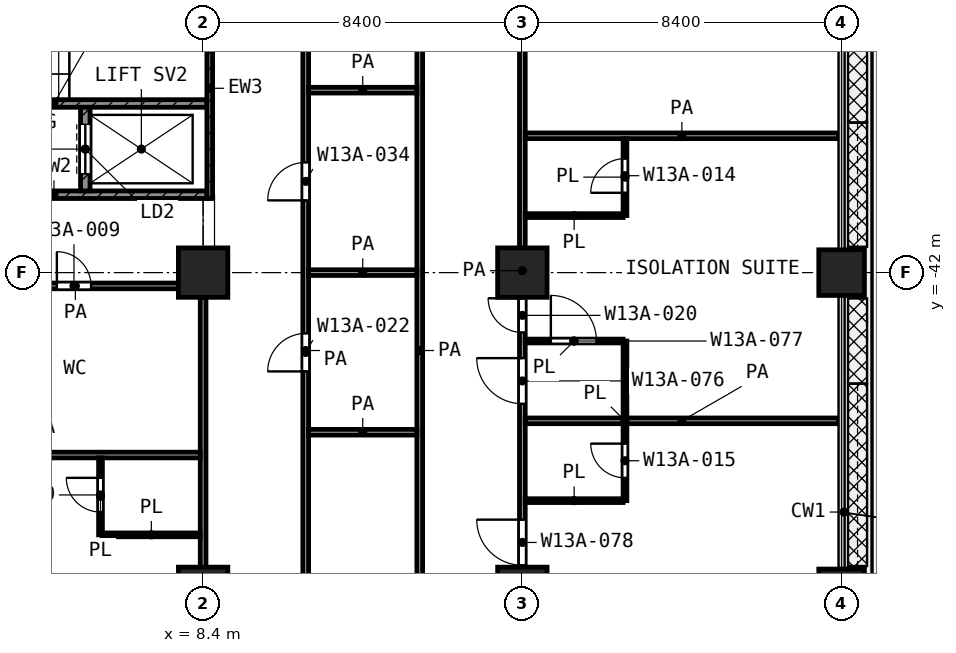
"""IFC4 building model, lengths in metres.
Left out: names, types, materials, properties, quantities, classifications, styles, units other than length and angle.
Written with IfcOpenShell. Run it as: python <this file> out.ifc"""

import sys

from ifc_helpers import new_model, si_unit, direction, frame, frame_2d, origin, origin_2d, place, context, subcontext, project, spatial, rectangle, extrude, element, fill, save


model = new_model("IFC4")
c1 = context("Model", 3, precision=1e-05, world=origin(), true_north=direction((0.0, 1.0)))
c2 = subcontext(c1, "Body", "Model", "MODEL_VIEW")
j1 = project(units=[si_unit("LENGTHUNIT", "METRE"), si_unit("PLANEANGLEUNIT", "RADIAN")], contexts=[c1])
p1 = place(None, origin())
s1 = spatial("IfcSite", under=j1, at=p1, CompositionType="ELEMENT")
p2 = place(p1, origin())
s2 = spatial("IfcBuilding", under=s1, at=p2, CompositionType="ELEMENT")
p3 = place(p2, frame((0.0, 0.0, 60.2)))
s3 = spatial("IfcBuildingStorey", under=s2, at=p3, CompositionType="ELEMENT", Elevation=60.2)
for number, where, z_axis, x_axis in (
    (1, (8.4, -42.0, 0.0), (0.0, 0.0, 1.0), (1.0, 0.0, 0.0)),
    (2, (16.8, -42.0, 0.0), (0.0, 0.0, 1.0), (1.0, 0.0, 0.0)),
):
    element("IfcColumn", number, at=place(p3, frame(where, z_axis=z_axis, x_axis=x_axis)), inside=s3, PredefinedType="COLUMN", context=c2, shape_type="SweptSolid", body=[
        extrude(rectangle(XDim=1.3, YDim=1.3, at=origin_2d()), origin(), (0.0, 0.0, 1.0), 4.2),
    ])
p4 = place(p3, frame((25.2, -42.0, 0.0), z_axis=(0.0, 0.0, 1.0), x_axis=(1.0, 0.0, 0.0)))
e3 = element("IfcColumn", 3, at=p4, inside=s3, PredefinedType="COLUMN", context=c2, shape_type="SweptSolid", body=[
    extrude(rectangle(XDim=1.2, YDim=1.2, at=origin_2d()), origin(), (0.0, 0.0, 1.0), 4.2),
])
for number, where, z_axis, x_axis in (
    (4, (8.4, -50.4, 0.0), (0.0, 0.0, 1.0), (1.0, 0.0, 0.0)),
    (5, (16.8, -50.4, 0.0), (0.0, 0.0, 1.0), (1.0, 0.0, 0.0)),
):
    element("IfcColumn", number, at=place(p3, frame(where, z_axis=z_axis, x_axis=x_axis)), inside=s3, PredefinedType="COLUMN", context=c2, shape_type="SweptSolid", body=[
        extrude(rectangle(XDim=1.3, YDim=1.3, at=origin_2d()), origin(), (0.0, 0.0, 1.0), 4.2),
    ])
p5 = place(p3, frame((25.2, -50.4, 0.0), z_axis=(0.0, 0.0, 1.0), x_axis=(1.0, 0.0, 0.0)))
e6 = element("IfcColumn", 6, at=p5, inside=s3, PredefinedType="COLUMN", context=c2, shape_type="SweptSolid", body=[
    extrude(rectangle(XDim=1.2, YDim=1.2, at=origin_2d()), origin(), (0.0, 0.0, 1.0), 4.2),
])
p6 = place(p3, frame((8.575, -40.05, 0.0), z_axis=(0.0, 0.0, 1.0), x_axis=(0.0, 1.0, 0.0)))
e7 = element("IfcWall", 7, at=p6, inside=s3, PredefinedType="SHEAR", context=c2, shape_type="SweptSolid", body=[
    extrude(rectangle(XDim=5.8, YDim=0.15, at=frame_2d((2.9, 0.0))), origin(), (0.0, 0.0, 1.0), 3.9),
])
p7 = place(p3, frame((0.45, -37.55, 0.0), z_axis=(0.0, 0.0, 1.0), x_axis=(1.0, 0.0, 0.0)))
e8 = element("IfcWall", 8, at=p7, inside=s3, PredefinedType="SHEAR", context=c2, shape_type="SweptSolid", body=[
    extrude(rectangle(XDim=8.05, YDim=0.2, at=frame_2d((4.025, 0.0))), origin(), (0.0, 0.0, 1.0), 3.9),
])
p8 = place(p7, frame((0.1, 0.0, 0.0)))
e9 = element("IfcOpeningElement", 9, at=p8, cuts=e8, PredefinedType="OPENING", context=c2, shape_type="SweptSolid", body=[
    extrude(rectangle(XDim=1.1, YDim=2.1, at=frame_2d((0.55, 1.05))), frame((0.0, 0.11, 0.0), z_axis=(0.0, -1.0, 0.0), x_axis=(1.0, 0.0, 0.0)), (0.0, 0.0, 1.0), 0.22),
])
p9 = place(p3, frame((0.45, -39.95, 0.0), z_axis=(0.0, 0.0, 1.0), x_axis=(1.0, 0.0, 0.0)))
e10 = element("IfcWall", 10, at=p9, inside=s3, PredefinedType="SHEAR", context=c2, shape_type="SweptSolid", body=[
    extrude(rectangle(XDim=8.05, YDim=0.2, at=frame_2d((4.025, 0.0))), origin(), (0.0, 0.0, 1.0), 3.9),
])
p10 = place(p9, frame((2.0, 0.0, 0.0)))
e11 = element("IfcOpeningElement", 11, at=p10, cuts=e10, PredefinedType="OPENING", context=c2, shape_type="SweptSolid", body=[
    extrude(rectangle(XDim=1.1, YDim=2.1, at=frame_2d((0.55, 1.05))), frame((0.0, 0.11, 0.0), z_axis=(0.0, -1.0, 0.0), x_axis=(1.0, 0.0, 0.0)), (0.0, 0.0, 1.0), 0.22),
])
p11 = place(p3, frame((5.3, -39.85, 0.0), z_axis=(0.0, 0.0, 1.0), x_axis=(0.0, 1.0, 0.0)))
e12 = element("IfcWall", 12, at=p11, inside=s3, PredefinedType="SHEAR", context=c2, shape_type="SweptSolid", body=[
    extrude(rectangle(XDim=2.2, YDim=0.25, at=frame_2d((1.1, 0.0))), origin(), (0.0, 0.0, 1.0), 3.9),
])
p12 = place(p11, frame((0.45, 0.0, 0.0)))
e13 = element("IfcOpeningElement", 13, at=p12, cuts=e12, PredefinedType="OPENING", context=c2, shape_type="SweptSolid", body=[
    extrude(rectangle(XDim=1.3, YDim=2.1, at=frame_2d((0.65, 1.05))), frame((0.0, 0.135, 0.0), z_axis=(0.0, -1.0, 0.0), x_axis=(1.0, 0.0, 0.0)), (0.0, 0.0, 1.0), 0.27),
])
for number, where, z_axis, x_axis in (
    (14, (5.75, -48.9, 0.0), (0.0, 0.0, 1.0), (1.0, 0.0, 0.0)),
    (15, (16.875, -48.0, 0.0), (0.0, 0.0, 1.0), (1.0, 0.0, 0.0)),
):
    element("IfcWall", number, at=place(p3, frame(where, z_axis=z_axis, x_axis=x_axis)), inside=s3, PredefinedType="PARTITIONING", context=c2, shape_type="SweptSolid", body=[
        extrude(rectangle(XDim=2.575, YDim=0.1, at=frame_2d((1.288, 0.0))), origin(), (0.0, 0.0, 1.0), 3.9),
    ])
p13 = place(p3, frame((16.875, -43.8, 0.0), z_axis=(0.0, 0.0, 1.0), x_axis=(1.0, 0.0, 0.0)))
e16 = element("IfcWall", 16, at=p13, inside=s3, PredefinedType="PARTITIONING", context=c2, shape_type="SweptSolid", body=[
    extrude(rectangle(XDim=2.575, YDim=0.1, at=frame_2d((1.288, 0.0))), origin(), (0.0, 0.0, 1.0), 3.9),
])
p14 = place(p13, frame((0.675, 0.0, 0.0)))
e17 = element("IfcOpeningElement", 17, at=p14, cuts=e16, PredefinedType="OPENING", context=c2, shape_type="SweptSolid", body=[
    extrude(rectangle(XDim=1.2, YDim=2.1, at=frame_2d((0.6, 1.05))), frame((0.0, 0.06, 0.0), z_axis=(0.0, -1.0, 0.0), x_axis=(1.0, 0.0, 0.0)), (0.0, 0.0, 1.0), 0.12),
])
p15 = place(p3, frame((16.875, -40.5, 0.0), z_axis=(0.0, 0.0, 1.0), x_axis=(1.0, 0.0, 0.0)))
e18 = element("IfcWall", 18, at=p15, inside=s3, PredefinedType="PARTITIONING", context=c2, shape_type="SweptSolid", body=[
    extrude(rectangle(XDim=2.575, YDim=0.1, at=frame_2d((1.288, 0.0))), origin(), (0.0, 0.0, 1.0), 3.9),
])
p16 = place(p3, frame((5.7, -48.9, 0.0), z_axis=(0.0, 0.0, 1.0), x_axis=(0.0, 1.0, 0.0)))
e19 = element("IfcWall", 19, at=p16, inside=s3, PredefinedType="PARTITIONING", context=c2, shape_type="SweptSolid", body=[
    extrude(rectangle(XDim=2.025, YDim=0.1, at=frame_2d((1.012, 0.0))), origin(), (0.0, 0.0, 1.0), 3.9),
])
p17 = place(p16, frame((0.6, 0.0, 0.0)))
e20 = element("IfcOpeningElement", 20, at=p17, cuts=e19, PredefinedType="OPENING", context=c2, shape_type="SweptSolid", body=[
    extrude(rectangle(XDim=0.9, YDim=2.1, at=frame_2d((0.45, 1.05))), frame((0.0, 0.06, 0.0), z_axis=(0.0, -1.0, 0.0), x_axis=(1.0, 0.0, 0.0)), (0.0, 0.0, 1.0), 0.12),
])
p18 = place(p3, frame((19.5, -48.0, 0.0), z_axis=(0.0, 0.0, 1.0), x_axis=(0.0, 1.0, 0.0)))
e21 = element("IfcWall", 21, at=p18, inside=s3, PredefinedType="PARTITIONING", context=c2, shape_type="SweptSolid", body=[
    extrude(rectangle(XDim=4.2, YDim=0.1, at=frame_2d((2.1, 0.0))), origin(), (0.0, 0.0, 1.0), 3.9),
])
p19 = place(p18, frame((0.6, 0.0, 0.0)))
e22 = element("IfcOpeningElement", 22, at=p19, cuts=e21, PredefinedType="OPENING", context=c2, shape_type="SweptSolid", body=[
    extrude(rectangle(XDim=0.9, YDim=2.1, at=frame_2d((0.45, 1.05))), frame((0.0, 0.06, 0.0), z_axis=(0.0, -1.0, 0.0), x_axis=(1.0, 0.0, 0.0)), (0.0, 0.0, 1.0), 0.12),
])
p20 = place(p3, frame((19.5, -40.5, 0.0), z_axis=(0.0, 0.0, 1.0), x_axis=(0.0, 1.0, 0.0)))
e23 = element("IfcWall", 23, at=p20, inside=s3, PredefinedType="PARTITIONING", context=c2, shape_type="SweptSolid", body=[
    extrude(rectangle(XDim=2.025, YDim=0.1, at=frame_2d((1.012, 0.0))), origin(), (0.0, 0.0, 1.0), 3.9),
])
p21 = place(p20, frame((0.6, 0.0, 0.0)))
e24 = element("IfcOpeningElement", 24, at=p21, cuts=e23, PredefinedType="OPENING", context=c2, shape_type="SweptSolid", body=[
    extrude(rectangle(XDim=0.9, YDim=2.1, at=frame_2d((0.45, 1.05))), frame((0.0, 0.06, 0.0), z_axis=(0.0, -1.0, 0.0), x_axis=(1.0, 0.0, 0.0)), (0.0, 0.0, 1.0), 0.12),
])
p22 = place(p3, frame((0.08, -46.8, 0.0), z_axis=(0.0, 0.0, 1.0), x_axis=(1.0, 0.0, 0.0)))
e25 = element("IfcWall", 25, at=p22, inside=s3, PredefinedType="PARTITIONING", context=c2, shape_type="SweptSolid", body=[
    extrude(rectangle(XDim=8.245, YDim=0.15, at=frame_2d((4.123, 0.0))), origin(), (0.0, 0.0, 1.0), 3.9),
])
p23 = place(p3, frame((11.175, -46.2, 0.0), z_axis=(0.0, 0.0, 1.0), x_axis=(1.0, 0.0, 0.0)))
e26 = element("IfcWall", 26, at=p23, inside=s3, PredefinedType="PARTITIONING", context=c2, shape_type="SweptSolid", body=[
    extrude(rectangle(XDim=2.85, YDim=0.15, at=frame_2d((1.425, 0.0))), origin(), (0.0, 0.0, 1.0), 3.9),
])
p24 = place(p3, frame((16.875, -45.9, 0.0), z_axis=(0.0, 0.0, 1.0), x_axis=(1.0, 0.0, 0.0)))
e27 = element("IfcWall", 27, at=p24, inside=s3, PredefinedType="PARTITIONING", context=c2, shape_type="SweptSolid", body=[
    extrude(rectangle(XDim=8.245, YDim=0.15, at=frame_2d((4.123, 0.0))), origin(), (0.0, 0.0, 1.0), 3.9),
])
p25 = place(p3, frame((2.328, -42.35, 0.0), z_axis=(0.0, 0.0, 1.0), x_axis=(1.0, 0.0, 0.0)))
e28 = element("IfcWall", 28, at=p25, inside=s3, PredefinedType="PARTITIONING", context=c2, shape_type="SweptSolid", body=[
    extrude(rectangle(XDim=5.422, YDim=0.15, at=frame_2d((2.711, 0.0))), origin(), (0.0, 0.0, 1.0), 3.9),
])
p26 = place(p25, frame((2.224, 0.0, 0.0)))
e29 = element("IfcOpeningElement", 29, at=p26, cuts=e28, PredefinedType="OPENING", context=c2, shape_type="SweptSolid", body=[
    extrude(rectangle(XDim=0.9, YDim=2.1, at=frame_2d((0.45, 1.05))), frame((0.0, 0.085, 0.0), z_axis=(0.0, -1.0, 0.0), x_axis=(1.0, 0.0, 0.0)), (0.0, 0.0, 1.0), 0.17),
])
p27 = place(p3, frame((11.175, -42.0, 0.0), z_axis=(0.0, 0.0, 1.0), x_axis=(1.0, 0.0, 0.0)))
e30 = element("IfcWall", 30, at=p27, inside=s3, PredefinedType="PARTITIONING", context=c2, shape_type="SweptSolid", body=[
    extrude(rectangle(XDim=2.85, YDim=0.15, at=frame_2d((1.425, 0.0))), origin(), (0.0, 0.0, 1.0), 3.9),
])
p28 = place(p3, frame((16.875, -38.4, 0.0), z_axis=(0.0, 0.0, 1.0), x_axis=(1.0, 0.0, 0.0)))
e31 = element("IfcWall", 31, at=p28, inside=s3, PredefinedType="PARTITIONING", context=c2, shape_type="SweptSolid", body=[
    extrude(rectangle(XDim=8.245, YDim=0.15, at=frame_2d((4.123, 0.0))), origin(), (0.0, 0.0, 1.0), 3.9),
])
p29 = place(p3, frame((11.175, -37.2, 0.0), z_axis=(0.0, 0.0, 1.0), x_axis=(1.0, 0.0, 0.0)))
e32 = element("IfcWall", 32, at=p29, inside=s3, PredefinedType="PARTITIONING", context=c2, shape_type="SweptSolid", body=[
    extrude(rectangle(XDim=2.85, YDim=0.15, at=frame_2d((1.425, 0.0))), origin(), (0.0, 0.0, 1.0), 3.9),
])
p30 = place(p3, frame((8.4, -66.55, 0.0), z_axis=(0.0, 0.0, 1.0), x_axis=(0.0, 1.0, 0.0)))
e33 = element("IfcWall", 33, at=p30, inside=s3, PredefinedType="PARTITIONING", context=c2, shape_type="SweptSolid", body=[
    extrude(rectangle(XDim=23.9, YDim=0.15, at=frame_2d((11.95, 0.0))), origin(), (0.0, 0.0, 1.0), 3.9),
])
p31 = place(p30, frame((14.55, 0.0, 0.0)))
e34 = element("IfcOpeningElement", 34, at=p31, cuts=e33, PredefinedType="OPENING", context=c2, shape_type="SweptSolid", body=[
    extrude(rectangle(XDim=0.9, YDim=2.1, at=frame_2d((0.45, 1.05))), frame((0.0, 0.085, 0.0), z_axis=(0.0, -1.0, 0.0), x_axis=(1.0, 0.0, 0.0)), (0.0, 0.0, 1.0), 0.17),
])
p32 = place(p30, frame((12.7, 0.0, 0.0)))
e35 = element("IfcOpeningElement", 35, at=p32, cuts=e33, PredefinedType="OPENING", context=c2, shape_type="SweptSolid", body=[
    extrude(rectangle(XDim=1.2, YDim=2.1, at=frame_2d((0.6, 1.05))), frame((0.0, 0.085, 0.0), z_axis=(0.0, -1.0, 0.0), x_axis=(1.0, 0.0, 0.0)), (0.0, 0.0, 1.0), 0.17),
])
p33 = place(p30, frame((5.85, 0.0, 0.0)))
e36 = element("IfcOpeningElement", 36, at=p33, cuts=e33, PredefinedType="OPENING", context=c2, shape_type="SweptSolid", body=[
    extrude(rectangle(XDim=1.2, YDim=2.1, at=frame_2d((0.6, 1.05))), frame((0.0, 0.085, 0.0), z_axis=(0.0, -1.0, 0.0), x_axis=(1.0, 0.0, 0.0)), (0.0, 0.0, 1.0), 0.17),
])
p34 = place(p30, frame((8.45, 0.0, 0.0)))
e37 = element("IfcOpeningElement", 37, at=p34, cuts=e33, PredefinedType="OPENING", context=c2, shape_type="SweptSolid", body=[
    extrude(rectangle(XDim=1.2, YDim=2.1, at=frame_2d((0.6, 1.05))), frame((0.0, 0.085, 0.0), z_axis=(0.0, -1.0, 0.0), x_axis=(1.0, 0.0, 0.0)), (0.0, 0.0, 1.0), 0.17),
])
p35 = place(p30, frame((3.7, 0.0, 0.0)))
e38 = element("IfcOpeningElement", 38, at=p35, cuts=e33, PredefinedType="OPENING", context=c2, shape_type="SweptSolid", body=[
    extrude(rectangle(XDim=1.2, YDim=2.1, at=frame_2d((0.6, 1.05))), frame((0.0, 0.085, 0.0), z_axis=(0.0, -1.0, 0.0), x_axis=(1.0, 0.0, 0.0)), (0.0, 0.0, 1.0), 0.17),
])
p36 = place(p30, frame((1.175, 0.0, 0.0)))
e39 = element("IfcOpeningElement", 39, at=p36, cuts=e33, PredefinedType="OPENING", context=c2, shape_type="SweptSolid", body=[
    extrude(rectangle(XDim=0.9, YDim=2.1, at=frame_2d((0.45, 1.05))), frame((0.0, 0.085, 0.0), z_axis=(0.0, -1.0, 0.0), x_axis=(1.0, 0.0, 0.0)), (0.0, 0.0, 1.0), 0.17),
])
p37 = place(p3, frame((11.1, -58.7, 0.0), z_axis=(0.0, 0.0, 1.0), x_axis=(0.0, 1.0, 0.0)))
e40 = element("IfcWall", 40, at=p37, inside=s3, PredefinedType="PARTITIONING", context=c2, shape_type="SweptSolid", body=[
    extrude(rectangle(XDim=29.3, YDim=0.15, at=frame_2d((14.65, 0.0))), origin(), (0.0, 0.0, 1.0), 3.9),
])
p38 = place(p37, frame((24.9, 0.0, 0.0)))
e41 = element("IfcOpeningElement", 41, at=p38, cuts=e40, PredefinedType="OPENING", context=c2, shape_type="SweptSolid", body=[
    extrude(rectangle(XDim=1.0, YDim=2.1, at=frame_2d((0.5, 1.05))), frame((0.0, 0.085, 0.0), z_axis=(0.0, -1.0, 0.0), x_axis=(1.0, 0.0, 0.0)), (0.0, 0.0, 1.0), 0.17),
])
p39 = place(p37, frame((18.6, 0.0, 0.0)))
e42 = element("IfcOpeningElement", 42, at=p39, cuts=e40, PredefinedType="OPENING", context=c2, shape_type="SweptSolid", body=[
    extrude(rectangle(XDim=1.0, YDim=2.1, at=frame_2d((0.5, 1.05))), frame((0.0, 0.085, 0.0), z_axis=(0.0, -1.0, 0.0), x_axis=(1.0, 0.0, 0.0)), (0.0, 0.0, 1.0), 0.17),
])
p40 = place(p37, frame((14.1, 0.0, 0.0)))
e43 = element("IfcOpeningElement", 43, at=p40, cuts=e40, PredefinedType="OPENING", context=c2, shape_type="SweptSolid", body=[
    extrude(rectangle(XDim=1.0, YDim=2.1, at=frame_2d((0.5, 1.05))), frame((0.0, 0.085, 0.0), z_axis=(0.0, -1.0, 0.0), x_axis=(1.0, 0.0, 0.0)), (0.0, 0.0, 1.0), 0.17),
])
p41 = place(p37, frame((1.2, 0.0, 0.0)))
e44 = element("IfcOpeningElement", 44, at=p41, cuts=e40, PredefinedType="OPENING", context=c2, shape_type="SweptSolid", body=[
    extrude(rectangle(XDim=1.0, YDim=2.1, at=frame_2d((0.5, 1.05))), frame((0.0, 0.085, 0.0), z_axis=(0.0, -1.0, 0.0), x_axis=(1.0, 0.0, 0.0)), (0.0, 0.0, 1.0), 0.17),
])
p42 = place(p3, frame((14.1, -58.7, 0.0), z_axis=(0.0, 0.0, 1.0), x_axis=(0.0, 1.0, 0.0)))
e45 = element("IfcWall", 45, at=p42, inside=s3, PredefinedType="PARTITIONING", context=c2, shape_type="SweptSolid", body=[
    extrude(rectangle(XDim=29.3, YDim=0.15, at=frame_2d((14.65, 0.0))), origin(), (0.0, 0.0, 1.0), 3.9),
])
p43 = place(p42, frame((7.5, 0.0, 0.0)))
e46 = element("IfcOpeningElement", 46, at=p43, cuts=e45, PredefinedType="OPENING", context=c2, shape_type="SweptSolid", body=[
    extrude(rectangle(XDim=1.0, YDim=2.1, at=frame_2d((0.5, 1.05))), frame((0.0, 0.085, 0.0), z_axis=(0.0, -1.0, 0.0), x_axis=(1.0, 0.0, 0.0)), (0.0, 0.0, 1.0), 0.17),
])
p44 = place(p3, frame((16.8, -58.798, 0.0), z_axis=(0.0, 0.0, 1.0), x_axis=(0.0, 1.0, 0.0)))
e47 = element("IfcWall", 47, at=p44, inside=s3, PredefinedType="PARTITIONING", context=c2, shape_type="SweptSolid", body=[
    extrude(rectangle(XDim=33.698, YDim=0.15, at=frame_2d((16.849, 0.0))), origin(), (0.0, 0.0, 1.0), 3.9),
])
p45 = place(p44, frame((23.298, 0.0, 0.0)))
e48 = element("IfcOpeningElement", 48, at=p45, cuts=e47, PredefinedType="OPENING", context=c2, shape_type="SweptSolid", body=[
    extrude(rectangle(XDim=1.2, YDim=2.1, at=frame_2d((0.6, 1.05))), frame((0.0, 0.085, 0.0), z_axis=(0.0, -1.0, 0.0), x_axis=(1.0, 0.0, 0.0)), (0.0, 0.0, 1.0), 0.17),
])
p46 = place(p44, frame((15.223, 0.0, 0.0)))
e49 = element("IfcOpeningElement", 49, at=p46, cuts=e47, PredefinedType="OPENING", context=c2, shape_type="SweptSolid", body=[
    extrude(rectangle(XDim=0.9, YDim=2.1, at=frame_2d((0.45, 1.05))), frame((0.0, 0.085, 0.0), z_axis=(0.0, -1.0, 0.0), x_axis=(1.0, 0.0, 0.0)), (0.0, 0.0, 1.0), 0.17),
])
p47 = place(p44, frame((13.348, 0.0, 0.0)))
e50 = element("IfcOpeningElement", 50, at=p47, cuts=e47, PredefinedType="OPENING", context=c2, shape_type="SweptSolid", body=[
    extrude(rectangle(XDim=1.2, YDim=2.1, at=frame_2d((0.6, 1.05))), frame((0.0, 0.085, 0.0), z_axis=(0.0, -1.0, 0.0), x_axis=(1.0, 0.0, 0.0)), (0.0, 0.0, 1.0), 0.17),
])
p48 = place(p44, frame((9.098, 0.0, 0.0)))
e51 = element("IfcOpeningElement", 51, at=p48, cuts=e47, PredefinedType="OPENING", context=c2, shape_type="SweptSolid", body=[
    extrude(rectangle(XDim=1.2, YDim=2.1, at=frame_2d((0.6, 1.05))), frame((0.0, 0.085, 0.0), z_axis=(0.0, -1.0, 0.0), x_axis=(1.0, 0.0, 0.0)), (0.0, 0.0, 1.0), 0.17),
])
p49 = place(p44, frame((6.498, 0.0, 0.0)))
e52 = element("IfcOpeningElement", 52, at=p49, cuts=e47, PredefinedType="OPENING", context=c2, shape_type="SweptSolid", body=[
    extrude(rectangle(XDim=1.2, YDim=2.1, at=frame_2d((0.6, 1.05))), frame((0.0, 0.085, 0.0), z_axis=(0.0, -1.0, 0.0), x_axis=(1.0, 0.0, 0.0)), (0.0, 0.0, 1.0), 0.17),
])
p50 = place(p44, frame((4.348, 0.0, 0.0)))
e53 = element("IfcOpeningElement", 53, at=p50, cuts=e47, PredefinedType="OPENING", context=c2, shape_type="SweptSolid", body=[
    extrude(rectangle(XDim=1.2, YDim=2.1, at=frame_2d((0.6, 1.05))), frame((0.0, 0.085, 0.0), z_axis=(0.0, -1.0, 0.0), x_axis=(1.0, 0.0, 0.0)), (0.0, 0.0, 1.0), 0.17),
])
p51 = place(p44, frame((0.698, 0.0, 0.0)))
e54 = element("IfcOpeningElement", 54, at=p51, cuts=e47, PredefinedType="OPENING", context=c2, shape_type="SweptSolid", body=[
    extrude(rectangle(XDim=0.9, YDim=2.1, at=frame_2d((0.45, 1.05))), frame((0.0, 0.085, 0.0), z_axis=(0.0, -1.0, 0.0), x_axis=(1.0, 0.0, 0.0)), (0.0, 0.0, 1.0), 0.17),
])
p52 = place(p12, origin())
e55 = element("IfcDoor", 55, at=p52, inside=s3, OperationType="DOUBLE_DOOR_SLIDING", PredefinedType="DOOR", context=c2, shape_type="SweptSolid", body=[
    extrude(rectangle(XDim=1.3, YDim=2.1, at=frame_2d((0.65, 1.05))), frame((0.0, 0.025, 0.0), z_axis=(0.0, -1.0, 0.0), x_axis=(1.0, 0.0, 0.0)), (0.0, 0.0, 1.0), 0.05),
])
fill(e13, e55)
p53 = place(p26, origin())
e56 = element("IfcDoor", 56, at=p53, inside=s3, OperationType="SINGLE_SWING_LEFT", PredefinedType="DOOR", context=c2, shape_type="SweptSolid", body=[
    extrude(rectangle(XDim=0.9, YDim=2.1, at=frame_2d((0.45, 1.05))), frame((0.0, 0.025, 0.0), z_axis=(0.0, -1.0, 0.0), x_axis=(1.0, 0.0, 0.0)), (0.0, 0.0, 1.0), 0.05),
])
fill(e29, e56)
p54 = place(p17, origin())
e57 = element("IfcDoor", 57, at=p54, inside=s3, OperationType="SINGLE_SWING_RIGHT", PredefinedType="DOOR", context=c2, shape_type="SweptSolid", body=[
    extrude(rectangle(XDim=0.9, YDim=2.1, at=frame_2d((0.45, 1.05))), frame((0.0, 0.025, 0.0), z_axis=(0.0, -1.0, 0.0), x_axis=(1.0, 0.0, 0.0)), (0.0, 0.0, 1.0), 0.05),
])
fill(e20, e57)
p55 = place(p39, origin())
e58 = element("IfcDoor", 58, at=p55, inside=s3, OperationType="SINGLE_SWING_LEFT", PredefinedType="DOOR", context=c2, shape_type="SweptSolid", body=[
    extrude(rectangle(XDim=1.0, YDim=2.1, at=frame_2d((0.5, 1.05))), frame((0.0, 0.025, 0.0), z_axis=(0.0, -1.0, 0.0), x_axis=(1.0, 0.0, 0.0)), (0.0, 0.0, 1.0), 0.05),
])
fill(e42, e58)
p56 = place(p40, origin())
e59 = element("IfcDoor", 59, at=p56, inside=s3, OperationType="SINGLE_SWING_LEFT", PredefinedType="DOOR", context=c2, shape_type="SweptSolid", body=[
    extrude(rectangle(XDim=1.0, YDim=2.1, at=frame_2d((0.5, 1.05))), frame((0.0, 0.025, 0.0), z_axis=(0.0, -1.0, 0.0), x_axis=(1.0, 0.0, 0.0)), (0.0, 0.0, 1.0), 0.05),
])
fill(e43, e59)
p57 = place(p46, origin())
e60 = element("IfcDoor", 60, at=p57, inside=s3, OperationType="SINGLE_SWING_RIGHT", PredefinedType="DOOR", context=c2, shape_type="SweptSolid", body=[
    extrude(rectangle(XDim=0.9, YDim=2.1, at=frame_2d((0.45, 1.05))), frame((0.0, 0.025, 0.0), z_axis=(0.0, -1.0, 0.0), x_axis=(1.0, 0.0, 0.0)), (0.0, 0.0, 1.0), 0.05),
])
fill(e49, e60)
p58 = place(p47, origin())
e61 = element("IfcDoor", 61, at=p58, inside=s3, OperationType="SINGLE_SWING_RIGHT", PredefinedType="DOOR", context=c2, shape_type="SweptSolid", body=[
    extrude(rectangle(XDim=1.2, YDim=2.1, at=frame_2d((0.6, 1.05))), frame((0.0, 0.025, 0.0), z_axis=(0.0, -1.0, 0.0), x_axis=(1.0, 0.0, 0.0)), (0.0, 0.0, 1.0), 0.05),
])
fill(e50, e61)
p59 = place(p14, origin())
e62 = element("IfcDoor", 62, at=p59, inside=s3, OperationType="SINGLE_SWING_LEFT", PredefinedType="DOOR", context=c2, shape_type="SweptSolid", body=[
    extrude(rectangle(XDim=1.2, YDim=2.1, at=frame_2d((0.6, 1.05))), frame((0.0, 0.025, 0.0), z_axis=(0.0, -1.0, 0.0), x_axis=(1.0, 0.0, 0.0)), (0.0, 0.0, 1.0), 0.05),
])
fill(e17, e62)
p60 = place(p21, origin())
e63 = element("IfcDoor", 63, at=p60, inside=s3, OperationType="SINGLE_SWING_LEFT", PredefinedType="DOOR", context=c2, shape_type="SweptSolid", body=[
    extrude(rectangle(XDim=0.9, YDim=2.1, at=frame_2d((0.45, 1.05))), frame((0.0, 0.025, 0.0), z_axis=(0.0, -1.0, 0.0), x_axis=(1.0, 0.0, 0.0)), (0.0, 0.0, 1.0), 0.05),
])
fill(e24, e63)
p61 = place(p48, origin())
e64 = element("IfcDoor", 64, at=p61, inside=s3, OperationType="SINGLE_SWING_RIGHT", PredefinedType="DOOR", context=c2, shape_type="SweptSolid", body=[
    extrude(rectangle(XDim=1.2, YDim=2.1, at=frame_2d((0.6, 1.05))), frame((0.0, 0.025, 0.0), z_axis=(0.0, -1.0, 0.0), x_axis=(1.0, 0.0, 0.0)), (0.0, 0.0, 1.0), 0.05),
])
fill(e51, e64)
p62 = place(p19, origin())
e65 = element("IfcDoor", 65, at=p62, inside=s3, OperationType="SINGLE_SWING_RIGHT", PredefinedType="DOOR", context=c2, shape_type="SweptSolid", body=[
    extrude(rectangle(XDim=0.9, YDim=2.1, at=frame_2d((0.45, 1.05))), frame((0.0, 0.025, 0.0), z_axis=(0.0, -1.0, 0.0), x_axis=(1.0, 0.0, 0.0)), (0.0, 0.0, 1.0), 0.05),
])
fill(e22, e65)
save(model, sys.argv[1])
